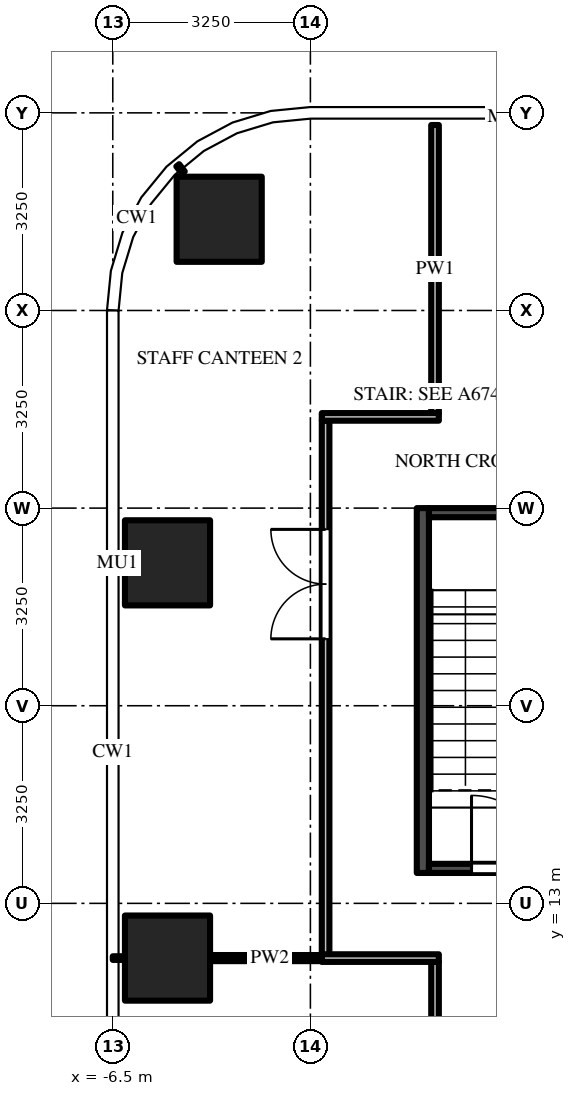
"""IFC4 building model, lengths in metres.
Left out: names, types, materials, properties, quantities, classifications, styles, units other than length and angle.
Written with IfcOpenShell. Run it as: python <this file> out.ifc"""

import sys

from ifc_helpers import new_model, si_unit, direction, frame, frame_2d, origin, origin_2d, place, context, subcontext, project, spatial, rectangle, extrude, source, transform, mapped, element, fill, save


model = new_model("IFC4")
c1 = context("Model", 3, precision=1e-05, world=origin(), true_north=direction((0.0, 1.0)))
c2 = subcontext(c1, "Body", "Model", "MODEL_VIEW")
j1 = project(units=[si_unit("LENGTHUNIT", "METRE"), si_unit("PLANEANGLEUNIT", "RADIAN")], contexts=[c1])
p1 = place(None, origin())
s1 = spatial("IfcSite", under=j1, at=p1, CompositionType="ELEMENT")
p2 = place(p1, origin())
s2 = spatial("IfcBuilding", under=s1, at=p2, CompositionType="ELEMENT")
p3 = place(p2, frame((0.0, 0.0, 74.5)))
s3 = spatial("IfcBuildingStorey", under=s2, at=p3, CompositionType="ELEMENT", Elevation=74.5)
m1 = source(origin(), c2, "Body", "SweptSolid", [
    extrude(rectangle(XDim=1.4, YDim=1.4, at=origin_2d()), origin(), (0.0, 0.0, 1.0), 4.5),
])
for number, where, z_axis, x_axis in (
    (1, (-5.6, 12.1, 0.0), (0.0, 0.0, 1.0), (1.0, 0.0, 0.0)),
    (2, (-5.6, 18.6, 0.0), (0.0, 0.0, 1.0), (1.0, 0.0, 0.0)),
    (3, (-4.75, 24.25, 0.0), (0.0, 0.0, 1.0), (1.0, 0.0, 0.0)),
):
    element("IfcColumn", number, at=place(p3, frame(where, z_axis=z_axis, x_axis=x_axis)), inside=s3, PredefinedType="COLUMN", context=c2, shape_type="MappedRepresentation", body=[
        mapped(m1, transform((0.0, 0.0, 0.0))),
    ])
m2 = source(origin(), c2, "Body", "SweptSolid", [
    extrude(rectangle(XDim=6.0, YDim=0.2, at=frame_2d((3.0, 0.0))), origin(), (0.0, 0.0, 1.0), 4.25),
])
p4 = place(p3, frame((-1.4, 13.5, 0.0), z_axis=(0.0, 0.0, 1.0), x_axis=(0.0, 1.0, 0.0)))
e4 = element("IfcWall", 4, at=p4, inside=s3, PredefinedType="SHEAR", context=c2, shape_type="MappedRepresentation", body=[
    mapped(m2, transform((0.0, 0.0, 0.0))),
])
m3 = source(origin(), c2, "Body", "SweptSolid", [
    extrude(rectangle(XDim=2.6, YDim=0.15, at=frame_2d((1.3, 0.0))), origin(), (0.0, 0.0, 1.0), 4.25),
])
p5 = place(p3, frame((-1.3, 13.575, 0.0), z_axis=(0.0, 0.0, 1.0), x_axis=(1.0, 0.0, 0.0)))
e5 = element("IfcWall", 5, at=p5, inside=s3, PredefinedType="SHEAR", context=c2, shape_type="MappedRepresentation", body=[
    mapped(m3, transform((0.0, 0.0, 0.0))),
])
m4 = source(origin(), c2, "Body", "SweptSolid", [
    extrude(rectangle(XDim=1.2, YDim=2.1, at=frame_2d((0.6, 1.05))), frame((0.0, 0.085, 0.0), z_axis=(0.0, -1.0, 0.0), x_axis=(1.0, 0.0, 0.0)), (0.0, 0.0, 1.0), 0.17),
])
p6 = place(p5, frame((0.7, 0.0, 0.0)))
e6 = element("IfcOpeningElement", 6, at=p6, cuts=e5, PredefinedType="OPENING", context=c2, shape_type="MappedRepresentation", body=[
    mapped(m4, transform((0.0, 0.0, 0.0))),
])
p7 = place(p3, frame((-1.3, 19.425, 0.0), z_axis=(0.0, 0.0, 1.0), x_axis=(1.0, 0.0, 0.0)))
e7 = element("IfcWall", 7, at=p7, inside=s3, PredefinedType="SHEAR", context=c2, shape_type="MappedRepresentation", body=[
    mapped(m3, transform((0.0, 0.0, 0.0))),
])
m5 = source(origin(), c2, "Body", "SweptSolid", [
    extrude(rectangle(XDim=8.788, YDim=0.125, at=frame_2d((4.394, 0.0))), origin(), (0.0, 0.0, 1.0), 3.468),
])
p8 = place(p3, frame((-3.0, 12.15, 0.0), z_axis=(0.0, 0.0, 1.0), x_axis=(0.0, 1.0, 0.0)))
e8 = element("IfcWall", 8, at=p8, inside=s3, PredefinedType="PARTITIONING", context=c2, shape_type="MappedRepresentation", body=[
    mapped(m5, transform((0.0, 0.0, 0.0))),
])
m6 = source(origin(), c2, "Body", "SweptSolid", [
    extrude(rectangle(XDim=1.8, YDim=2.1, at=frame_2d((0.9, 1.05))), frame((0.0, 0.073, 0.0), z_axis=(0.0, -1.0, 0.0), x_axis=(1.0, 0.0, 0.0)), (0.0, 0.0, 1.0), 0.145),
])
p9 = place(p8, frame((5.2, 0.0, 0.0)))
e9 = element("IfcOpeningElement", 9, at=p9, cuts=e8, PredefinedType="OPENING", context=c2, shape_type="MappedRepresentation", body=[
    mapped(m6, transform((0.0, 0.0, 0.0))),
])
m7 = source(origin(), c2, "Body", "SweptSolid", [
    extrude(rectangle(XDim=8.725, YDim=0.125, at=frame_2d((4.363, 0.0))), origin(), (0.0, 0.0, 1.0), 3.468),
])
p10 = place(p3, frame((-1.2, 12.038, 0.0), z_axis=(0.0, 0.0, 1.0), x_axis=(0.0, -1.0, 0.0)))
e10 = element("IfcWall", 10, at=p10, inside=s3, PredefinedType="PARTITIONING", context=c2, shape_type="MappedRepresentation", body=[
    mapped(m7, transform((0.0, 0.0, 0.0))),
])
m8 = source(origin(), c2, "Body", "SweptSolid", [
    extrude(rectangle(XDim=1.0, YDim=2.1, at=frame_2d((0.5, 1.05))), frame((0.0, 0.073, 0.0), z_axis=(0.0, -1.0, 0.0), x_axis=(1.0, 0.0, 0.0)), (0.0, 0.0, 1.0), 0.145),
])
p11 = place(p10, frame((5.887, 0.0, 0.0)))
e11 = element("IfcOpeningElement", 11, at=p11, cuts=e10, PredefinedType="OPENING", context=c2, shape_type="MappedRepresentation", body=[
    mapped(m8, transform((0.0, 0.0, 0.0))),
])
m9 = source(origin(), c2, "Body", "SweptSolid", [
    extrude(rectangle(XDim=1.2, YDim=2.1, at=frame_2d((0.6, 1.05))), frame((0.0, 0.073, 0.0), z_axis=(0.0, -1.0, 0.0), x_axis=(1.0, 0.0, 0.0)), (0.0, 0.0, 1.0), 0.145),
])
p12 = place(p10, frame((3.988, 0.0, 0.0)))
e12 = element("IfcOpeningElement", 12, at=p12, cuts=e10, PredefinedType="OPENING", context=c2, shape_type="MappedRepresentation", body=[
    mapped(m9, transform((0.0, 0.0, 0.0))),
])
m10 = source(origin(), c2, "Body", "SweptSolid", [
    extrude(rectangle(XDim=4.738, YDim=0.125, at=frame_2d((2.369, 0.0))), origin(), (0.0, 0.0, 1.0), 3.33),
])
p13 = place(p3, frame((-1.2, 25.8, 0.0), z_axis=(0.0, 0.0, 1.0), x_axis=(0.0, -1.0, 0.0)))
e13 = element("IfcWall", 13, at=p13, inside=s3, PredefinedType="PARTITIONING", context=c2, shape_type="MappedRepresentation", body=[
    mapped(m10, transform((0.0, 0.0, 0.0))),
])
m11 = source(origin(), c2, "Body", "SweptSolid", [
    extrude(rectangle(XDim=1.962, YDim=0.1, at=frame_2d((0.981, 0.0))), origin(), (0.0, 0.0, 1.0), 3.468),
])
p14 = place(p3, frame((-4.9, 12.1, 0.0), z_axis=(0.0, 0.0, 1.0), x_axis=(1.0, 0.0, 0.0)))
e14 = element("IfcWall", 14, at=p14, inside=s3, PredefinedType="PARTITIONING", context=c2, shape_type="MappedRepresentation", body=[
    mapped(m11, transform((0.0, 0.0, 0.0))),
])
m12 = source(origin(), c2, "Body", "SweptSolid", [
    extrude(rectangle(XDim=1.925, YDim=0.125, at=frame_2d((0.962, 0.0))), origin(), (0.0, 0.0, 1.0), 3.468),
])
p15 = place(p3, frame((-1.137, 12.1, 0.0), z_axis=(0.0, 0.0, 1.0), x_axis=(-1.0, 0.0, 0.0)))
e15 = element("IfcWall", 15, at=p15, inside=s3, PredefinedType="PARTITIONING", context=c2, shape_type="MappedRepresentation", body=[
    mapped(m12, transform((0.0, 0.0, 0.0))),
])
m13 = source(origin(), c2, "Body", "SweptSolid", [
    extrude(rectangle(XDim=1.925, YDim=0.125, at=frame_2d((0.962, 0.0))), origin(), (0.0, 0.0, 1.0), 4.25),
])
p16 = place(p3, frame((-3.062, 21.0, 0.0), z_axis=(0.0, 0.0, 1.0), x_axis=(1.0, 0.0, 0.0)))
e16 = element("IfcWall", 16, at=p16, inside=s3, PredefinedType="PARTITIONING", context=c2, shape_type="MappedRepresentation", body=[
    mapped(m13, transform((0.0, 0.0, 0.0))),
])
m14 = source(origin(), c2, "Body", "SweptSolid", [
    extrude(rectangle(XDim=1.2, YDim=2.1, at=frame_2d((0.6, 1.05))), frame((0.0, 0.025, 0.0), z_axis=(0.0, -1.0, 0.0), x_axis=(1.0, 0.0, 0.0)), (0.0, 0.0, 1.0), 0.05),
])
p17 = place(p6, origin())
e17 = element("IfcDoor", 17, at=p17, inside=s3, OperationType="SINGLE_SWING_LEFT", PredefinedType="DOOR", context=c2, shape_type="MappedRepresentation", body=[
    mapped(m14, transform((0.0, 0.0, 0.0))),
])
fill(e6, e17)
m15 = source(origin(), c2, "Body", "SweptSolid", [
    extrude(rectangle(XDim=1.8, YDim=2.1, at=frame_2d((0.9, 1.05))), frame((0.0, 0.025, 0.0), z_axis=(0.0, -1.0, 0.0), x_axis=(1.0, 0.0, 0.0)), (0.0, 0.0, 1.0), 0.05),
])
p18 = place(p9, origin())
e18 = element("IfcDoor", 18, at=p18, inside=s3, OperationType="DOUBLE_DOOR_SINGLE_SWING", PredefinedType="DOOR", context=c2, shape_type="MappedRepresentation", body=[
    mapped(m15, transform((0.0, 0.0, 0.0))),
])
fill(e9, e18)
save(model, sys.argv[1])
